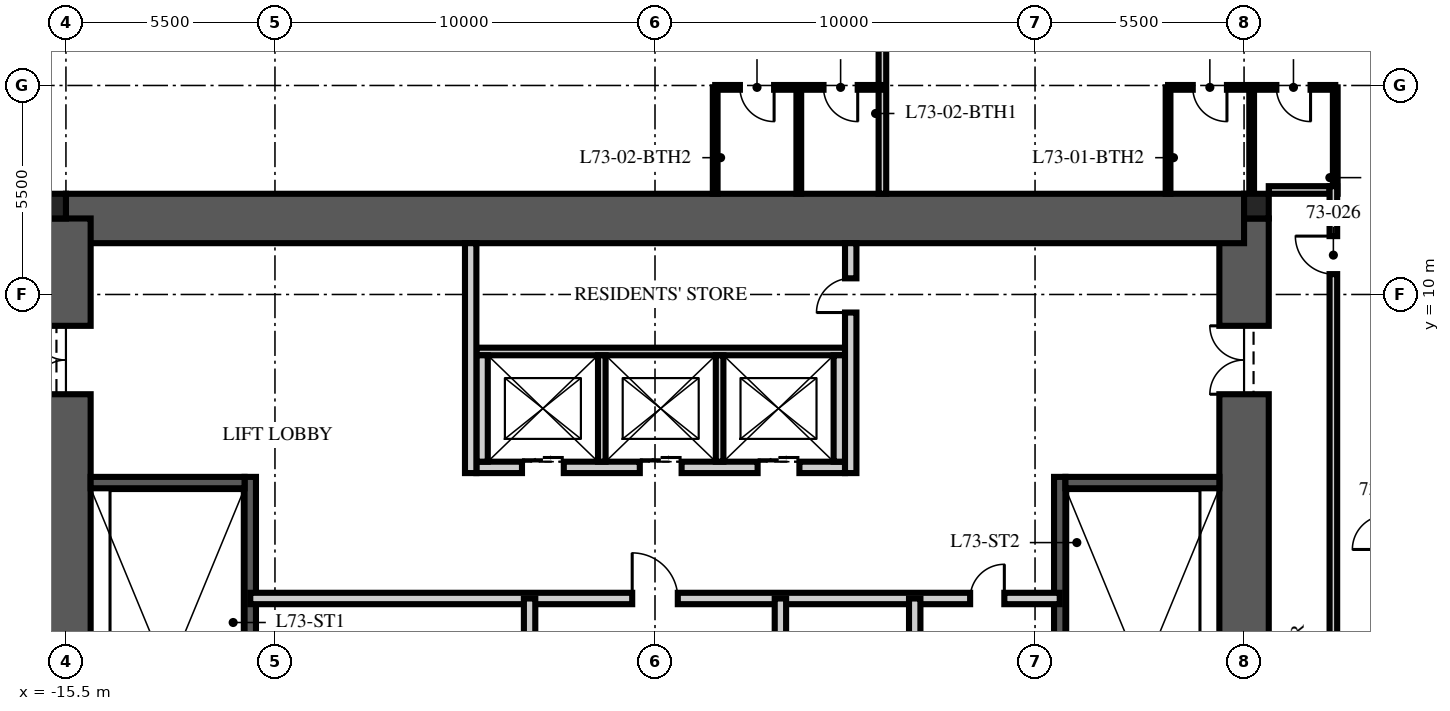
"""IFC4 building model, lengths in metres.
Left out: names, types, materials, properties, quantities, classifications, styles, units other than length and angle.
Written with IfcOpenShell. Run it as: python <this file> out.ifc"""

import sys

from ifc_helpers import new_model, si_unit, direction, frame, frame_2d, origin, origin_2d, place, context, subcontext, project, spatial, rectangle, extrude, element, fill, save


model = new_model("IFC4")
c1 = context("Model", 3, precision=1e-05, world=origin(), true_north=direction((0.0, 1.0)))
c2 = subcontext(c1, "Body", "Model", "MODEL_VIEW")
j1 = project(units=[si_unit("LENGTHUNIT", "METRE"), si_unit("PLANEANGLEUNIT", "RADIAN")], contexts=[c1])
p1 = place(None, origin())
s1 = spatial("IfcSite", under=j1, at=p1, CompositionType="ELEMENT")
p2 = place(p1, origin())
s2 = spatial("IfcBuilding", under=s1, at=p2, CompositionType="ELEMENT")
p3 = place(p2, frame((0.0, 0.0, 293.25)))
s3 = spatial("IfcBuildingStorey", under=s2, at=p3, CompositionType="ELEMENT", Elevation=293.25)
p4 = place(p3, frame((15.5, -12.0, -0.25), z_axis=(0.0, 0.0, 1.0), x_axis=(0.0, 1.0, 0.0)))
e1 = element("IfcWall", 1, at=p4, inside=s3, PredefinedType="SHEAR", context=c2, shape_type="SweptSolid", body=[
    extrude(rectangle(XDim=24.0, YDim=1.3, at=frame_2d((12.0, 0.0))), origin(), (0.0, 0.0, 1.0), 3.75),
])
p5 = place(p4, frame((3.125, 0.0, 0.25)))
e2 = element("IfcOpeningElement", 2, at=p5, cuts=e1, PredefinedType="OPENING", context=c2, shape_type="SweptSolid", body=[
    extrude(rectangle(XDim=1.2, YDim=2.1, at=frame_2d((0.6, 1.05))), frame((0.0, 0.66, 0.0), z_axis=(0.0, -1.0, 0.0), x_axis=(1.0, 0.0, 0.0)), (0.0, 0.0, 1.0), 1.32),
])
p6 = place(p4, frame((19.375, 0.0, 0.25)))
e3 = element("IfcOpeningElement", 3, at=p6, cuts=e1, PredefinedType="OPENING", context=c2, shape_type="SweptSolid", body=[
    extrude(rectangle(XDim=1.8, YDim=2.1, at=frame_2d((0.9, 1.05))), frame((0.0, 0.66, 0.0), z_axis=(0.0, -1.0, 0.0), x_axis=(1.0, 0.0, 0.0)), (0.0, 0.0, 1.0), 1.32),
])
p7 = place(p3, frame((-15.5, 12.0, -0.25), z_axis=(0.0, 0.0, 1.0), x_axis=(1.0, 0.0, 0.0)))
e4 = element("IfcWall", 4, at=p7, inside=s3, PredefinedType="SHEAR", context=c2, shape_type="SweptSolid", body=[
    extrude(rectangle(XDim=31.0, YDim=1.3, at=frame_2d((15.5, 0.0))), origin(), (0.0, 0.0, 1.0), 3.75),
])
p8 = place(p3, frame((-15.5, -12.0, -0.25), z_axis=(0.0, 0.0, 1.0), x_axis=(0.0, 1.0, 0.0)))
e5 = element("IfcWall", 5, at=p8, inside=s3, PredefinedType="SHEAR", context=c2, shape_type="SweptSolid", body=[
    extrude(rectangle(XDim=24.0, YDim=1.3, at=frame_2d((12.0, 0.0))), origin(), (0.0, 0.0, 1.0), 3.75),
])
p9 = place(p8, frame((3.125, 0.0, 0.25)))
e6 = element("IfcOpeningElement", 6, at=p9, cuts=e5, PredefinedType="OPENING", context=c2, shape_type="SweptSolid", body=[
    extrude(rectangle(XDim=1.2, YDim=2.1, at=frame_2d((0.6, 1.05))), frame((0.0, 0.66, 0.0), z_axis=(0.0, -1.0, 0.0), x_axis=(1.0, 0.0, 0.0)), (0.0, 0.0, 1.0), 1.32),
])
p10 = place(p8, frame((19.375, 0.0, 0.25)))
e7 = element("IfcOpeningElement", 7, at=p10, cuts=e5, PredefinedType="OPENING", context=c2, shape_type="SweptSolid", body=[
    extrude(rectangle(XDim=1.8, YDim=2.1, at=frame_2d((0.9, 1.05))), frame((0.0, 0.66, 0.0), z_axis=(0.0, -1.0, 0.0), x_axis=(1.0, 0.0, 0.0)), (0.0, 0.0, 1.0), 1.32),
])
for number, where, z_axis, x_axis in (
    (8, (15.825, 12.325, -0.25), (0.0, 0.0, 1.0), (1.0, 0.0, 0.0)),
    (9, (-15.825, 12.325, -0.25), (0.0, 0.0, 1.0), (1.0, 0.0, 0.0)),
):
    element("IfcColumn", number, at=place(p3, frame(where, z_axis=z_axis, x_axis=x_axis)), inside=s3, PredefinedType="COLUMN", context=c2, shape_type="SweptSolid", body=[
        extrude(rectangle(XDim=0.65, YDim=0.65, at=origin_2d()), origin(), (0.0, 0.0, 1.0), 3.75),
    ])
p11 = place(p3, frame((-10.65, -4.9, 0.0), z_axis=(0.0, 0.0, 1.0), x_axis=(0.0, 1.0, 0.0)))
e10 = element("IfcWall", 10, at=p11, inside=s3, PredefinedType="SOLIDWALL", context=c2, shape_type="SweptSolid", body=[
    extrude(rectangle(XDim=10.1, YDim=0.3, at=frame_2d((5.05, 0.0))), origin(), (0.0, 0.0, 1.0), 3.5),
])
p12 = place(p3, frame((-14.85, 5.05, 0.0), z_axis=(0.0, 0.0, 1.0), x_axis=(1.0, 0.0, 0.0)))
e11 = element("IfcWall", 11, at=p12, inside=s3, PredefinedType="SOLIDWALL", context=c2, shape_type="SweptSolid", body=[
    extrude(rectangle(XDim=4.05, YDim=0.3, at=frame_2d((2.025, 0.0))), origin(), (0.0, 0.0, 1.0), 3.5),
])
p13 = place(p3, frame((10.65, -4.9, 0.0), z_axis=(0.0, 0.0, 1.0), x_axis=(0.0, 1.0, 0.0)))
e12 = element("IfcWall", 12, at=p13, inside=s3, PredefinedType="SOLIDWALL", context=c2, shape_type="SweptSolid", body=[
    extrude(rectangle(XDim=10.1, YDim=0.3, at=frame_2d((5.05, 0.0))), origin(), (0.0, 0.0, 1.0), 3.5),
])
p14 = place(p3, frame((14.85, 5.05, 0.0), z_axis=(0.0, 0.0, 1.0), x_axis=(-1.0, 0.0, 0.0)))
e13 = element("IfcWall", 13, at=p14, inside=s3, PredefinedType="SOLIDWALL", context=c2, shape_type="SweptSolid", body=[
    extrude(rectangle(XDim=4.05, YDim=0.3, at=frame_2d((2.025, 0.0))), origin(), (0.0, 0.0, 1.0), 3.5),
])
p15 = place(p3, frame((-4.7, 5.45, 0.0), z_axis=(0.0, 0.0, 1.0), x_axis=(1.0, 0.0, 0.0)))
e14 = element("IfcWall", 14, at=p15, inside=s3, PredefinedType="PARTITIONING", context=c2, shape_type="SweptSolid", body=[
    extrude(rectangle(XDim=9.7, YDim=0.3, at=frame_2d((4.85, 0.0))), origin(), (0.0, 0.0, 1.0), 3.5),
])
p16 = place(p15, frame((1.2, 0.0, 0.0)))
e15 = element("IfcOpeningElement", 15, at=p16, cuts=e14, PredefinedType="OPENING", context=c2, shape_type="SweptSolid", body=[
    extrude(rectangle(XDim=1.1, YDim=2.1, at=frame_2d((0.55, 1.05))), frame((0.0, 0.16, 0.0), z_axis=(0.0, -1.0, 0.0), x_axis=(1.0, 0.0, 0.0)), (0.0, 0.0, 1.0), 0.32),
])
p17 = place(p15, frame((4.3, 0.0, 0.0)))
e16 = element("IfcOpeningElement", 16, at=p17, cuts=e14, PredefinedType="OPENING", context=c2, shape_type="SweptSolid", body=[
    extrude(rectangle(XDim=1.1, YDim=2.1, at=frame_2d((0.55, 1.05))), frame((0.0, 0.16, 0.0), z_axis=(0.0, -1.0, 0.0), x_axis=(1.0, 0.0, 0.0)), (0.0, 0.0, 1.0), 0.32),
])
p18 = place(p15, frame((7.4, 0.0, 0.0)))
e17 = element("IfcOpeningElement", 17, at=p18, cuts=e14, PredefinedType="OPENING", context=c2, shape_type="SweptSolid", body=[
    extrude(rectangle(XDim=1.1, YDim=2.1, at=frame_2d((0.55, 1.05))), frame((0.0, 0.16, 0.0), z_axis=(0.0, -1.0, 0.0), x_axis=(1.0, 0.0, 0.0)), (0.0, 0.0, 1.0), 0.32),
])
p19 = place(p3, frame((-4.7, 8.5, 0.0), z_axis=(0.0, 0.0, 1.0), x_axis=(1.0, 0.0, 0.0)))
e18 = element("IfcWall", 18, at=p19, inside=s3, PredefinedType="PARTITIONING", context=c2, shape_type="SweptSolid", body=[
    extrude(rectangle(XDim=9.7, YDim=0.2, at=frame_2d((4.85, 0.0))), origin(), (0.0, 0.0, 1.0), 3.5),
])
for number, where, z_axis, x_axis in (
    (19, (-4.55, 5.6, 0.0), (0.0, 0.0, 1.0), (0.0, 1.0, 0.0)),
    (20, (4.85, 5.6, 0.0), (0.0, 0.0, 1.0), (0.0, 1.0, 0.0)),
):
    element("IfcWall", number, at=place(p3, frame(where, z_axis=z_axis, x_axis=x_axis)), inside=s3, PredefinedType="PARTITIONING", context=c2, shape_type="SweptSolid", body=[
        extrude(rectangle(XDim=2.8, YDim=0.3, at=frame_2d((1.4, 0.0))), origin(), (0.0, 0.0, 1.0), 3.5),
    ])
for number, where, z_axis, x_axis in (
    (21, (-1.4, 5.6, 0.0), (0.0, 0.0, 1.0), (0.0, 1.0, 0.0)),
    (22, (1.7, 5.6, 0.0), (0.0, 0.0, 1.0), (0.0, 1.0, 0.0)),
):
    element("IfcWall", number, at=place(p3, frame(where, z_axis=z_axis, x_axis=x_axis)), inside=s3, PredefinedType="PARTITIONING", context=c2, shape_type="SweptSolid", body=[
        extrude(rectangle(XDim=2.8, YDim=0.2, at=frame_2d((1.4, 0.0))), origin(), (0.0, 0.0, 1.0), 3.5),
    ])
p20 = place(p3, frame((-10.65, 2.0, 0.0), z_axis=(0.0, 0.0, 1.0), x_axis=(1.0, 0.0, 0.0)))
e23 = element("IfcWall", 23, at=p20, inside=s3, PredefinedType="PARTITIONING", context=c2, shape_type="SweptSolid", body=[
    extrude(rectangle(XDim=21.3, YDim=0.3, at=frame_2d((10.65, 0.0))), origin(), (0.0, 0.0, 1.0), 3.5),
])
p21 = place(p20, frame((10.05, 0.0, 0.0)))
e24 = element("IfcOpeningElement", 24, at=p21, cuts=e23, PredefinedType="OPENING", context=c2, shape_type="SweptSolid", body=[
    extrude(rectangle(XDim=1.2, YDim=2.1, at=frame_2d((0.6, 1.05))), frame((0.0, 0.16, 0.0), z_axis=(0.0, -1.0, 0.0), x_axis=(1.0, 0.0, 0.0)), (0.0, 0.0, 1.0), 0.32),
])
p22 = place(p20, frame((18.942, 0.0, 0.0)))
e25 = element("IfcOpeningElement", 25, at=p22, cuts=e23, PredefinedType="OPENING", context=c2, shape_type="SweptSolid", body=[
    extrude(rectangle(XDim=0.9, YDim=2.1, at=frame_2d((0.45, 1.05))), frame((0.0, 0.16, 0.0), z_axis=(0.0, -1.0, 0.0), x_axis=(1.0, 0.0, 0.0)), (0.0, 0.0, 1.0), 0.32),
])
p23 = place(p3, frame((-3.3, -6.65, 0.0), z_axis=(0.0, 0.0, 1.0), x_axis=(0.0, 1.0, 0.0)))
e26 = element("IfcWall", 26, at=p23, inside=s3, PredefinedType="PARTITIONING", context=c2, shape_type="SweptSolid", body=[
    extrude(rectangle(XDim=8.65, YDim=0.3, at=frame_2d((4.325, 0.0))), origin(), (0.0, 0.0, 1.0), 3.5),
])
p24 = place(p23, frame((1.75, 0.0, 0.0)))
e27 = element("IfcOpeningElement", 27, at=p24, cuts=e26, PredefinedType="OPENING", context=c2, shape_type="SweptSolid", body=[
    extrude(rectangle(XDim=0.9, YDim=2.1, at=frame_2d((0.45, 1.05))), frame((0.0, 0.16, 0.0), z_axis=(0.0, -1.0, 0.0), x_axis=(1.0, 0.0, 0.0)), (0.0, 0.0, 1.0), 0.32),
])
p25 = place(p23, frame((6.075, 0.0, 0.0)))
e28 = element("IfcOpeningElement", 28, at=p25, cuts=e26, PredefinedType="OPENING", context=c2, shape_type="SweptSolid", body=[
    extrude(rectangle(XDim=0.9, YDim=2.1, at=frame_2d((0.45, 1.05))), frame((0.0, 0.16, 0.0), z_axis=(0.0, -1.0, 0.0), x_axis=(1.0, 0.0, 0.0)), (0.0, 0.0, 1.0), 0.32),
])
p26 = place(p3, frame((3.3, -6.65, 0.0), z_axis=(0.0, 0.0, 1.0), x_axis=(0.0, 1.0, 0.0)))
e29 = element("IfcWall", 29, at=p26, inside=s3, PredefinedType="PARTITIONING", context=c2, shape_type="SweptSolid", body=[
    extrude(rectangle(XDim=8.65, YDim=0.3, at=frame_2d((4.325, 0.0))), origin(), (0.0, 0.0, 1.0), 3.5),
])
p27 = place(p26, frame((3.875, 0.0, 0.0)))
e30 = element("IfcOpeningElement", 30, at=p27, cuts=e29, PredefinedType="OPENING", context=c2, shape_type="SweptSolid", body=[
    extrude(rectangle(XDim=0.9, YDim=2.1, at=frame_2d((0.45, 1.05))), frame((0.0, 0.16, 0.0), z_axis=(0.0, -1.0, 0.0), x_axis=(1.0, 0.0, 0.0)), (0.0, 0.0, 1.0), 0.32),
])
p28 = place(p3, frame((6.834, -6.65, 0.0), z_axis=(0.0, 0.0, 1.0), x_axis=(0.0, 1.0, 0.0)))
e31 = element("IfcWall", 31, at=p28, inside=s3, PredefinedType="PARTITIONING", context=c2, shape_type="SweptSolid", body=[
    extrude(rectangle(XDim=8.65, YDim=0.3, at=frame_2d((4.325, 0.0))), origin(), (0.0, 0.0, 1.0), 3.5),
])
p29 = place(p3, frame((-4.85, 5.3, 0.0), z_axis=(0.0, 0.0, 1.0), x_axis=(0.0, 1.0, 0.0)))
e32 = element("IfcWall", 32, at=p29, inside=s3, PredefinedType="PARTITIONING", context=c2, shape_type="SweptSolid", body=[
    extrude(rectangle(XDim=6.05, YDim=0.3, at=frame_2d((3.025, 0.0))), origin(), (0.0, 0.0, 1.0), 3.5),
])
p30 = place(p3, frame((5.15, 5.3, 0.0), z_axis=(0.0, 0.0, 1.0), x_axis=(0.0, 1.0, 0.0)))
e33 = element("IfcWall", 33, at=p30, inside=s3, PredefinedType="PARTITIONING", context=c2, shape_type="SweptSolid", body=[
    extrude(rectangle(XDim=6.05, YDim=0.3, at=frame_2d((3.025, 0.0))), origin(), (0.0, 0.0, 1.0), 3.5),
])
p31 = place(p30, frame((4.225, 0.0, 0.0)))
e34 = element("IfcOpeningElement", 34, at=p31, cuts=e33, PredefinedType="OPENING", context=c2, shape_type="SweptSolid", body=[
    extrude(rectangle(XDim=0.9, YDim=2.1, at=frame_2d((0.45, 1.05))), frame((0.0, 0.16, 0.0), z_axis=(0.0, -1.0, 0.0), x_axis=(1.0, 0.0, 0.0)), (0.0, 0.0, 1.0), 0.32),
])
p32 = place(p3, frame((16.15, 12.75, 0.0), z_axis=(0.0, 0.0, 1.0), x_axis=(1.0, 0.0, 0.0)))
e35 = element("IfcWall", 35, at=p32, inside=s3, PredefinedType="PARTITIONING", context=c2, shape_type="SweptSolid", body=[
    extrude(rectangle(XDim=1.6, YDim=0.2, at=frame_2d((0.8, 0.0))), origin(), (0.0, 0.0, 1.0), 2.6),
])
p33 = place(p3, frame((5.984, 12.65, 0.0), z_axis=(0.0, 0.0, 1.0), x_axis=(0.0, 1.0, 0.0)))
e36 = element("IfcWall", 36, at=p33, inside=s3, PredefinedType="PARTITIONING", context=c2, shape_type="SweptSolid", body=[
    extrude(rectangle(XDim=11.1, YDim=0.2, at=frame_2d((5.55, 0.0))), origin(), (0.0, 0.0, 1.0), 3.01),
])
p34 = place(p3, frame((17.9, 15.45, 0.0), z_axis=(0.0, 0.0, 1.0), x_axis=(-1.0, 0.0, 0.0)))
e37 = element("IfcWall", 37, at=p34, inside=s3, PredefinedType="PARTITIONING", context=c2, shape_type="SweptSolid", body=[
    extrude(rectangle(XDim=4.4, YDim=0.125, at=frame_2d((2.2, 0.0))), origin(), (0.0, 0.0, 1.0), 2.6),
])
p35 = place(p34, frame((0.65, 0.0, 0.0)))
e38 = element("IfcOpeningElement", 38, at=p35, cuts=e37, PredefinedType="OPENING", context=c2, shape_type="SweptSolid", body=[
    extrude(rectangle(XDim=0.9, YDim=2.1, at=frame_2d((0.45, 1.05))), frame((0.0, 0.073, 0.0), z_axis=(0.0, -1.0, 0.0), x_axis=(1.0, 0.0, 0.0)), (0.0, 0.0, 1.0), 0.145),
])
p36 = place(p34, frame((2.85, 0.0, 0.0)))
e39 = element("IfcOpeningElement", 39, at=p36, cuts=e37, PredefinedType="OPENING", context=c2, shape_type="SweptSolid", body=[
    extrude(rectangle(XDim=0.9, YDim=2.1, at=frame_2d((0.45, 1.05))), frame((0.0, 0.073, 0.0), z_axis=(0.0, -1.0, 0.0), x_axis=(1.0, 0.0, 0.0)), (0.0, 0.0, 1.0), 0.145),
])
p37 = place(p3, frame((17.9, 12.65, 0.0), z_axis=(0.0, 0.0, 1.0), x_axis=(0.0, 1.0, 0.0)))
e40 = element("IfcWall", 40, at=p37, inside=s3, PredefinedType="PARTITIONING", context=c2, shape_type="SweptSolid", body=[
    extrude(rectangle(XDim=2.8, YDim=0.125, at=frame_2d((1.4, 0.0))), origin(), (0.0, 0.0, 1.0), 2.9),
])
p38 = place(p3, frame((15.7, 12.65, 0.0), z_axis=(0.0, 0.0, 1.0), x_axis=(0.0, 1.0, 0.0)))
e41 = element("IfcWall", 41, at=p38, inside=s3, PredefinedType="PARTITIONING", context=c2, shape_type="SweptSolid", body=[
    extrude(rectangle(XDim=2.8, YDim=0.125, at=frame_2d((1.4, 0.0))), origin(), (0.0, 0.0, 1.0), 2.6),
])
p39 = place(p3, frame((13.5, 12.65, 0.0), z_axis=(0.0, 0.0, 1.0), x_axis=(0.0, 1.0, 0.0)))
e42 = element("IfcWall", 42, at=p39, inside=s3, PredefinedType="PARTITIONING", context=c2, shape_type="SweptSolid", body=[
    extrude(rectangle(XDim=2.8, YDim=0.125, at=frame_2d((1.4, 0.0))), origin(), (0.0, 0.0, 1.0), 3.5),
])
p40 = place(p3, frame((5.984, 15.45, 0.0), z_axis=(0.0, 0.0, 1.0), x_axis=(-1.0, 0.0, 0.0)))
e43 = element("IfcWall", 43, at=p40, inside=s3, PredefinedType="PARTITIONING", context=c2, shape_type="SweptSolid", body=[
    extrude(rectangle(XDim=4.4, YDim=0.125, at=frame_2d((2.2, 0.0))), origin(), (0.0, 0.0, 1.0), 2.91),
])
p41 = place(p40, frame((0.65, 0.0, 0.0)))
e44 = element("IfcOpeningElement", 44, at=p41, cuts=e43, PredefinedType="OPENING", context=c2, shape_type="SweptSolid", body=[
    extrude(rectangle(XDim=0.9, YDim=2.1, at=frame_2d((0.45, 1.05))), frame((0.0, 0.073, 0.0), z_axis=(0.0, -1.0, 0.0), x_axis=(1.0, 0.0, 0.0)), (0.0, 0.0, 1.0), 0.145),
])
p42 = place(p40, frame((2.85, 0.0, 0.0)))
e45 = element("IfcOpeningElement", 45, at=p42, cuts=e43, PredefinedType="OPENING", context=c2, shape_type="SweptSolid", body=[
    extrude(rectangle(XDim=0.9, YDim=2.1, at=frame_2d((0.45, 1.05))), frame((0.0, 0.073, 0.0), z_axis=(0.0, -1.0, 0.0), x_axis=(1.0, 0.0, 0.0)), (0.0, 0.0, 1.0), 0.145),
])
p43 = place(p3, frame((3.784, 12.65, 0.0), z_axis=(0.0, 0.0, 1.0), x_axis=(0.0, 1.0, 0.0)))
e46 = element("IfcWall", 46, at=p43, inside=s3, PredefinedType="PARTITIONING", context=c2, shape_type="SweptSolid", body=[
    extrude(rectangle(XDim=2.8, YDim=0.125, at=frame_2d((1.4, 0.0))), origin(), (0.0, 0.0, 1.0), 2.91),
])
p44 = place(p3, frame((1.584, 12.65, 0.0), z_axis=(0.0, 0.0, 1.0), x_axis=(0.0, 1.0, 0.0)))
e47 = element("IfcWall", 47, at=p44, inside=s3, PredefinedType="PARTITIONING", context=c2, shape_type="SweptSolid", body=[
    extrude(rectangle(XDim=2.8, YDim=0.125, at=frame_2d((1.4, 0.0))), origin(), (0.0, 0.0, 1.0), 3.5),
])
p45 = place(p3, frame((17.85, -12.85, 0.0), z_axis=(0.0, 0.0, 1.0), x_axis=(0.0, 1.0, 0.0)))
e48 = element("IfcWall", 48, at=p45, inside=s3, PredefinedType="PARTITIONING", context=c2, shape_type="SweptSolid", body=[
    extrude(rectangle(XDim=25.7, YDim=0.2, at=frame_2d((12.85, 0.0))), origin(), (0.0, 0.0, 1.0), 2.9),
])
p46 = place(p45, frame((23.386, 0.0, 0.0)))
e49 = element("IfcOpeningElement", 49, at=p46, cuts=e48, PredefinedType="OPENING", context=c2, shape_type="SweptSolid", body=[
    extrude(rectangle(XDim=1.0, YDim=2.2, at=frame_2d((0.5, 1.1))), frame((0.0, 0.11, 0.0), z_axis=(0.0, -1.0, 0.0), x_axis=(1.0, 0.0, 0.0)), (0.0, 0.0, 1.0), 0.22),
])
p47 = place(p45, frame((5.1, 0.0, 0.0)))
e50 = element("IfcOpeningElement", 50, at=p47, cuts=e48, PredefinedType="OPENING", context=c2, shape_type="SweptSolid", body=[
    extrude(rectangle(XDim=1.0, YDim=2.2, at=frame_2d((0.5, 1.1))), frame((0.0, 0.11, 0.0), z_axis=(0.0, -1.0, 0.0), x_axis=(1.0, 0.0, 0.0)), (0.0, 0.0, 1.0), 0.22),
])
p48 = place(p10, origin())
e51 = element("IfcDoor", 51, at=p48, inside=s3, OperationType="DOUBLE_DOOR_SINGLE_SWING", PredefinedType="DOOR", context=c2, shape_type="SweptSolid", body=[
    extrude(rectangle(XDim=1.8, YDim=2.1, at=frame_2d((0.9, 1.05))), frame((0.0, 0.025, 0.0), z_axis=(0.0, -1.0, 0.0), x_axis=(1.0, 0.0, 0.0)), (0.0, 0.0, 1.0), 0.05),
])
fill(e7, e51)
p49 = place(p6, origin())
e52 = element("IfcDoor", 52, at=p49, inside=s3, OperationType="DOUBLE_DOOR_SINGLE_SWING", PredefinedType="DOOR", context=c2, shape_type="SweptSolid", body=[
    extrude(rectangle(XDim=1.8, YDim=2.1, at=frame_2d((0.9, 1.05))), frame((0.0, 0.025, 0.0), z_axis=(0.0, -1.0, 0.0), x_axis=(1.0, 0.0, 0.0)), (0.0, 0.0, 1.0), 0.05),
])
fill(e3, e52)
p50 = place(p16, origin())
e53 = element("IfcDoor", 53, at=p50, inside=s3, OperationType="DOUBLE_DOOR_SLIDING", PredefinedType="DOOR", context=c2, shape_type="SweptSolid", body=[
    extrude(rectangle(XDim=1.1, YDim=2.1, at=frame_2d((0.55, 1.05))), frame((0.0, 0.025, 0.0), z_axis=(0.0, -1.0, 0.0), x_axis=(1.0, 0.0, 0.0)), (0.0, 0.0, 1.0), 0.05),
])
fill(e15, e53)
p51 = place(p17, origin())
e54 = element("IfcDoor", 54, at=p51, inside=s3, OperationType="DOUBLE_DOOR_SLIDING", PredefinedType="DOOR", context=c2, shape_type="SweptSolid", body=[
    extrude(rectangle(XDim=1.1, YDim=2.1, at=frame_2d((0.55, 1.05))), frame((0.0, 0.025, 0.0), z_axis=(0.0, -1.0, 0.0), x_axis=(1.0, 0.0, 0.0)), (0.0, 0.0, 1.0), 0.05),
])
fill(e16, e54)
p52 = place(p18, origin())
e55 = element("IfcDoor", 55, at=p52, inside=s3, OperationType="DOUBLE_DOOR_SLIDING", PredefinedType="DOOR", context=c2, shape_type="SweptSolid", body=[
    extrude(rectangle(XDim=1.1, YDim=2.1, at=frame_2d((0.55, 1.05))), frame((0.0, 0.025, 0.0), z_axis=(0.0, -1.0, 0.0), x_axis=(1.0, 0.0, 0.0)), (0.0, 0.0, 1.0), 0.05),
])
fill(e17, e55)
p53 = place(p21, origin())
e56 = element("IfcDoor", 56, at=p53, inside=s3, OperationType="SINGLE_SWING_LEFT", PredefinedType="DOOR", context=c2, shape_type="SweptSolid", body=[
    extrude(rectangle(XDim=1.2, YDim=2.1, at=frame_2d((0.6, 1.05))), frame((0.0, 0.025, 0.0), z_axis=(0.0, -1.0, 0.0), x_axis=(1.0, 0.0, 0.0)), (0.0, 0.0, 1.0), 0.05),
])
fill(e24, e56)
p54 = place(p22, origin())
e57 = element("IfcDoor", 57, at=p54, inside=s3, OperationType="SINGLE_SWING_RIGHT", PredefinedType="DOOR", context=c2, shape_type="SweptSolid", body=[
    extrude(rectangle(XDim=0.9, YDim=2.1, at=frame_2d((0.45, 1.05))), frame((0.0, 0.025, 0.0), z_axis=(0.0, -1.0, 0.0), x_axis=(1.0, 0.0, 0.0)), (0.0, 0.0, 1.0), 0.05),
])
fill(e25, e57)
p55 = place(p31, origin())
e58 = element("IfcDoor", 58, at=p55, inside=s3, OperationType="SINGLE_SWING_LEFT", PredefinedType="DOOR", context=c2, shape_type="SweptSolid", body=[
    extrude(rectangle(XDim=0.9, YDim=2.1, at=frame_2d((0.45, 1.05))), frame((0.0, 0.025, 0.0), z_axis=(0.0, -1.0, 0.0), x_axis=(1.0, 0.0, 0.0)), (0.0, 0.0, 1.0), 0.05),
])
fill(e34, e58)
p56 = place(p35, origin())
e59 = element("IfcDoor", 59, at=p56, inside=s3, OperationType="SINGLE_SWING_LEFT", PredefinedType="DOOR", context=c2, shape_type="SweptSolid", body=[
    extrude(rectangle(XDim=0.9, YDim=2.1, at=frame_2d((0.45, 1.05))), frame((0.0, 0.025, 0.0), z_axis=(0.0, -1.0, 0.0), x_axis=(1.0, 0.0, 0.0)), (0.0, 0.0, 1.0), 0.05),
])
fill(e38, e59)
p57 = place(p36, origin())
e60 = element("IfcDoor", 60, at=p57, inside=s3, OperationType="SINGLE_SWING_LEFT", PredefinedType="DOOR", context=c2, shape_type="SweptSolid", body=[
    extrude(rectangle(XDim=0.9, YDim=2.1, at=frame_2d((0.45, 1.05))), frame((0.0, 0.025, 0.0), z_axis=(0.0, -1.0, 0.0), x_axis=(1.0, 0.0, 0.0)), (0.0, 0.0, 1.0), 0.05),
])
fill(e39, e60)
p58 = place(p46, origin())
e61 = element("IfcDoor", 61, at=p58, inside=s3, OperationType="SINGLE_SWING_RIGHT", PredefinedType="DOOR", context=c2, shape_type="SweptSolid", body=[
    extrude(rectangle(XDim=1.0, YDim=2.2, at=frame_2d((0.5, 1.1))), frame((0.0, 0.025, 0.0), z_axis=(0.0, -1.0, 0.0), x_axis=(1.0, 0.0, 0.0)), (0.0, 0.0, 1.0), 0.05),
])
fill(e49, e61)
p59 = place(p41, origin())
e62 = element("IfcDoor", 62, at=p59, inside=s3, OperationType="SINGLE_SWING_LEFT", PredefinedType="DOOR", context=c2, shape_type="SweptSolid", body=[
    extrude(rectangle(XDim=0.9, YDim=2.1, at=frame_2d((0.45, 1.05))), frame((0.0, 0.025, 0.0), z_axis=(0.0, -1.0, 0.0), x_axis=(1.0, 0.0, 0.0)), (0.0, 0.0, 1.0), 0.05),
])
fill(e44, e62)
p60 = place(p42, origin())
e63 = element("IfcDoor", 63, at=p60, inside=s3, OperationType="SINGLE_SWING_LEFT", PredefinedType="DOOR", context=c2, shape_type="SweptSolid", body=[
    extrude(rectangle(XDim=0.9, YDim=2.1, at=frame_2d((0.45, 1.05))), frame((0.0, 0.025, 0.0), z_axis=(0.0, -1.0, 0.0), x_axis=(1.0, 0.0, 0.0)), (0.0, 0.0, 1.0), 0.05),
])
fill(e45, e63)
save(model, sys.argv[1])
